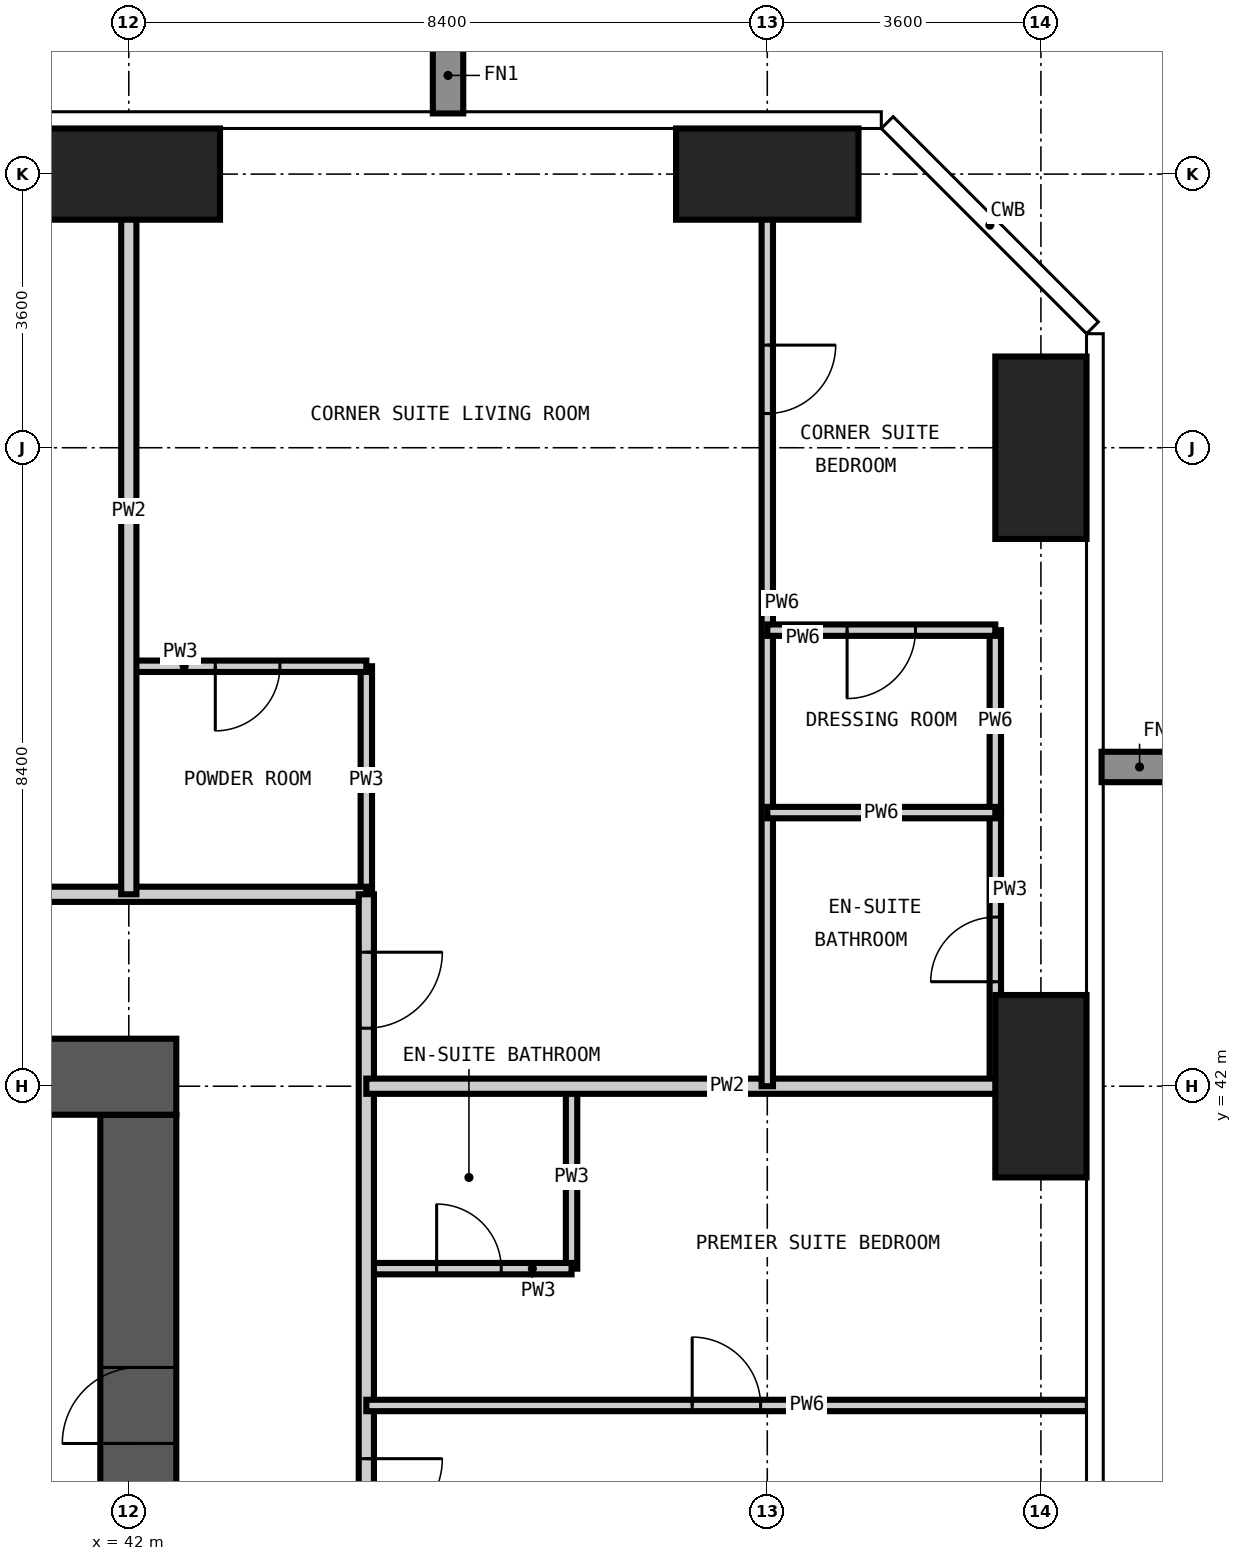
"""IFC4 building model, lengths in metres.
Left out: names, types, materials, properties, quantities, classifications, styles, units other than length and angle.
Written with IfcOpenShell. Run it as: python <this file> out.ifc"""

import sys

from ifc_helpers import new_model, si_unit, direction, frame, frame_2d, origin, origin_2d, place, context, subcontext, project, spatial, rectangle, extrude, element, fill, save


model = new_model("IFC4")
c1 = context("Model", 3, precision=1e-05, world=origin(), true_north=direction((0.0, 1.0)))
c2 = subcontext(c1, "Body", "Model", "MODEL_VIEW")
j1 = project(units=[si_unit("LENGTHUNIT", "METRE"), si_unit("PLANEANGLEUNIT", "RADIAN")], contexts=[c1])
p1 = place(None, origin())
s1 = spatial("IfcSite", under=j1, at=p1, CompositionType="ELEMENT")
p2 = place(p1, origin())
s2 = spatial("IfcBuilding", under=s1, at=p2, CompositionType="ELEMENT")
p3 = place(p2, frame((0.0, 0.0, 118.8)))
s3 = spatial("IfcBuildingStorey", under=s2, at=p3, CompositionType="ELEMENT", Elevation=118.8)
for number, where, z_axis, x_axis in (
    (1, (42.0, 54.0, -0.35), (0.0, 0.0, 1.0), (1.0, 0.0, 0.0)),
    (2, (50.4, 54.0, -0.35), (0.0, 0.0, 1.0), (1.0, 0.0, 0.0)),
):
    element("IfcColumn", number, at=place(p3, frame(where, z_axis=z_axis, x_axis=x_axis)), inside=s3, PredefinedType="COLUMN", context=c2, shape_type="SweptSolid", body=[
        extrude(rectangle(XDim=2.4, YDim=1.2, at=origin_2d()), origin(), (0.0, 0.0, 1.0), 3.6),
    ])
for number, where, z_axis, x_axis in (
    (3, (54.0, 42.0, -0.35), (0.0, 0.0, 1.0), (1.0, 0.0, 0.0)),
    (4, (54.0, 50.4, -0.35), (0.0, 0.0, 1.0), (1.0, 0.0, 0.0)),
):
    element("IfcColumn", number, at=place(p3, frame(where, z_axis=z_axis, x_axis=x_axis)), inside=s3, PredefinedType="COLUMN", context=c2, shape_type="SweptSolid", body=[
        extrude(rectangle(XDim=1.2, YDim=2.4, at=origin_2d()), origin(), (0.0, 0.0, 1.0), 3.6),
    ])
p4 = place(p3, frame((42.125, 17.175, -0.35), z_axis=(0.0, 0.0, 1.0), x_axis=(0.0, 1.0, 0.0)))
e5 = element("IfcWall", 5, at=p4, inside=s3, PredefinedType="SHEAR", context=c2, shape_type="SweptSolid", body=[
    extrude(rectangle(XDim=24.45, YDim=1.0, at=frame_2d((12.225, 0.0))), origin(), (0.0, 0.0, 1.0), 3.6),
])
p5 = place(p4, frame((0.425, 0.0, 0.35)))
e6 = element("IfcOpeningElement", 6, at=p5, cuts=e5, PredefinedType="OPENING", context=c2, shape_type="SweptSolid", body=[
    extrude(rectangle(XDim=1.2, YDim=2.2, at=frame_2d((0.6, 1.1))), frame((0.0, 0.51, 0.0), z_axis=(0.0, -1.0, 0.0), x_axis=(1.0, 0.0, 0.0)), (0.0, 0.0, 1.0), 1.02),
])
p6 = place(p4, frame((11.325, 0.0, 0.35)))
e7 = element("IfcOpeningElement", 7, at=p6, cuts=e5, PredefinedType="OPENING", context=c2, shape_type="SweptSolid", body=[
    extrude(rectangle(XDim=1.8, YDim=2.2, at=frame_2d((0.9, 1.1))), frame((0.0, 0.51, 0.0), z_axis=(0.0, -1.0, 0.0), x_axis=(1.0, 0.0, 0.0)), (0.0, 0.0, 1.0), 1.02),
])
p7 = place(p4, frame((20.125, 0.0, 0.35)))
e8 = element("IfcOpeningElement", 8, at=p7, cuts=e5, PredefinedType="OPENING", context=c2, shape_type="SweptSolid", body=[
    extrude(rectangle(XDim=1.0, YDim=2.1, at=frame_2d((0.5, 1.05))), frame((0.0, 0.51, 0.0), z_axis=(0.0, -1.0, 0.0), x_axis=(1.0, 0.0, 0.0)), (0.0, 0.0, 1.0), 1.02),
])
p8 = place(p3, frame((42.625, 42.125, -0.35), z_axis=(0.0, 0.0, 1.0), x_axis=(-1.0, 0.0, 0.0)))
e9 = element("IfcWall", 9, at=p8, inside=s3, PredefinedType="SHEAR", context=c2, shape_type="SweptSolid", body=[
    extrude(rectangle(XDim=26.45, YDim=1.0, at=frame_2d((13.225, 0.0))), origin(), (0.0, 0.0, 1.0), 3.6),
])
p9 = place(p8, frame((21.125, 0.0, 0.35)))
e10 = element("IfcOpeningElement", 10, at=p9, cuts=e9, PredefinedType="OPENING", context=c2, shape_type="SweptSolid", body=[
    extrude(rectangle(XDim=1.0, YDim=2.1, at=frame_2d((0.5, 1.05))), frame((0.0, 0.51, 0.0), z_axis=(0.0, -1.0, 0.0), x_axis=(1.0, 0.0, 0.0)), (0.0, 0.0, 1.0), 1.02),
])
p10 = place(p8, frame((10.525, 0.0, 0.35)))
e11 = element("IfcOpeningElement", 11, at=p10, cuts=e9, PredefinedType="OPENING", context=c2, shape_type="SweptSolid", body=[
    extrude(rectangle(XDim=1.2, YDim=2.2, at=frame_2d((0.6, 1.1))), frame((0.0, 0.51, 0.0), z_axis=(0.0, -1.0, 0.0), x_axis=(1.0, 0.0, 0.0)), (0.0, 0.0, 1.0), 1.02),
])
p11 = place(p3, frame((45.125, 44.525, 0.0), z_axis=(0.0, 0.0, 1.0), x_axis=(0.0, 1.0, 0.0)))
e12 = element("IfcWall", 12, at=p11, inside=s3, PredefinedType="PARTITIONING", context=c2, shape_type="SweptSolid", body=[
    extrude(rectangle(XDim=3.0, YDim=0.15, at=frame_2d((1.5, 0.0))), origin(), (0.0, 0.0, 1.0), 3.25),
])
p12 = place(p3, frame((47.825, 39.6, 0.0), z_axis=(0.0, 0.0, 1.0), x_axis=(0.0, 1.0, 0.0)))
e13 = element("IfcWall", 13, at=p12, inside=s3, PredefinedType="PARTITIONING", context=c2, shape_type="SweptSolid", body=[
    extrude(rectangle(XDim=2.4, YDim=0.15, at=frame_2d((1.2, 0.0))), origin(), (0.0, 0.0, 1.0), 3.25),
])
p13 = place(p3, frame((53.4, 42.0, 0.0), z_axis=(0.0, 0.0, 1.0), x_axis=(0.0, 1.0, 0.0)))
e14 = element("IfcWall", 14, at=p13, inside=s3, PredefinedType="PARTITIONING", context=c2, shape_type="SweptSolid", body=[
    extrude(rectangle(XDim=3.6, YDim=0.15, at=frame_2d((1.8, 0.0))), origin(), (0.0, 0.0, 1.0), 3.25),
])
p14 = place(p13, frame((1.375, 0.0, 0.0)))
e15 = element("IfcOpeningElement", 15, at=p14, cuts=e14, PredefinedType="OPENING", context=c2, shape_type="SweptSolid", body=[
    extrude(rectangle(XDim=0.85, YDim=2.1, at=frame_2d((0.425, 1.05))), frame((0.0, 0.085, 0.0), z_axis=(0.0, -1.0, 0.0), x_axis=(1.0, 0.0, 0.0)), (0.0, 0.0, 1.0), 0.17),
])
p15 = place(p3, frame((45.125, 39.6, 0.0), z_axis=(0.0, 0.0, 1.0), x_axis=(1.0, 0.0, 0.0)))
e16 = element("IfcWall", 16, at=p15, inside=s3, PredefinedType="PARTITIONING", context=c2, shape_type="SweptSolid", body=[
    extrude(rectangle(XDim=2.7, YDim=0.15, at=frame_2d((1.35, 0.0))), origin(), (0.0, 0.0, 1.0), 3.25),
])
p16 = place(p15, frame((0.925, 0.0, 0.0)))
e17 = element("IfcOpeningElement", 17, at=p16, cuts=e16, PredefinedType="OPENING", context=c2, shape_type="SweptSolid", body=[
    extrude(rectangle(XDim=0.85, YDim=2.1, at=frame_2d((0.425, 1.05))), frame((0.0, 0.085, 0.0), z_axis=(0.0, -1.0, 0.0), x_axis=(1.0, 0.0, 0.0)), (0.0, 0.0, 1.0), 0.17),
])
p17 = place(p3, frame((42.0, 47.525, 0.0), z_axis=(0.0, 0.0, 1.0), x_axis=(1.0, 0.0, 0.0)))
e18 = element("IfcWall", 18, at=p17, inside=s3, PredefinedType="PARTITIONING", context=c2, shape_type="SweptSolid", body=[
    extrude(rectangle(XDim=3.125, YDim=0.15, at=frame_2d((1.562, 0.0))), origin(), (0.0, 0.0, 1.0), 3.25),
])
p18 = place(p17, frame((1.138, 0.0, 0.0)))
e19 = element("IfcOpeningElement", 19, at=p18, cuts=e18, PredefinedType="OPENING", context=c2, shape_type="SweptSolid", body=[
    extrude(rectangle(XDim=0.85, YDim=2.1, at=frame_2d((0.425, 1.05))), frame((0.0, 0.085, 0.0), z_axis=(0.0, -1.0, 0.0), x_axis=(1.0, 0.0, 0.0)), (0.0, 0.0, 1.0), 0.17),
])
p19 = place(p3, frame((12.6, 44.525, 0.0), z_axis=(0.0, 0.0, 1.0), x_axis=(1.0, 0.0, 0.0)))
e20 = element("IfcWall", 20, at=p19, inside=s3, PredefinedType="PARTITIONING", context=c2, shape_type="SweptSolid", body=[
    extrude(rectangle(XDim=32.525, YDim=0.2, at=frame_2d((16.262, 0.0))), origin(), (0.0, 0.0, 1.0), 3.25),
])
p20 = place(p19, frame((9.1, 0.0, 0.0)))
e21 = element("IfcOpeningElement", 21, at=p20, cuts=e20, PredefinedType="OPENING", context=c2, shape_type="SweptSolid", body=[
    extrude(rectangle(XDim=1.0, YDim=2.2, at=frame_2d((0.5, 1.1))), frame((0.0, 0.11, 0.0), z_axis=(0.0, -1.0, 0.0), x_axis=(1.0, 0.0, 0.0)), (0.0, 0.0, 1.0), 0.22),
])
p21 = place(p19, frame((17.5, 0.0, 0.0)))
e22 = element("IfcOpeningElement", 22, at=p21, cuts=e20, PredefinedType="OPENING", context=c2, shape_type="SweptSolid", body=[
    extrude(rectangle(XDim=1.0, YDim=2.2, at=frame_2d((0.5, 1.1))), frame((0.0, 0.11, 0.0), z_axis=(0.0, -1.0, 0.0), x_axis=(1.0, 0.0, 0.0)), (0.0, 0.0, 1.0), 0.22),
])
p22 = place(p19, frame((25.9, 0.0, 0.0)))
e23 = element("IfcOpeningElement", 23, at=p22, cuts=e20, PredefinedType="OPENING", context=c2, shape_type="SweptSolid", body=[
    extrude(rectangle(XDim=1.0, YDim=2.2, at=frame_2d((0.5, 1.1))), frame((0.0, 0.11, 0.0), z_axis=(0.0, -1.0, 0.0), x_axis=(1.0, 0.0, 0.0)), (0.0, 0.0, 1.0), 0.22),
])
p23 = place(p3, frame((45.125, 44.525, 0.0), z_axis=(0.0, 0.0, 1.0), x_axis=(0.0, -1.0, 0.0)))
e24 = element("IfcWall", 24, at=p23, inside=s3, PredefinedType="PARTITIONING", context=c2, shape_type="SweptSolid", body=[
    extrude(rectangle(XDim=31.45, YDim=0.2, at=frame_2d((15.725, 0.0))), origin(), (0.0, 0.0, 1.0), 3.25),
])
p24 = place(p23, frame((24.225, 0.0, 0.0)))
e25 = element("IfcOpeningElement", 25, at=p24, cuts=e24, PredefinedType="OPENING", context=c2, shape_type="SweptSolid", body=[
    extrude(rectangle(XDim=1.0, YDim=2.2, at=frame_2d((0.5, 1.1))), frame((0.0, 0.11, 0.0), z_axis=(0.0, -1.0, 0.0), x_axis=(1.0, 0.0, 0.0)), (0.0, 0.0, 1.0), 0.22),
])
p25 = place(p23, frame((15.825, 0.0, 0.0)))
e26 = element("IfcOpeningElement", 26, at=p25, cuts=e24, PredefinedType="OPENING", context=c2, shape_type="SweptSolid", body=[
    extrude(rectangle(XDim=1.0, YDim=2.2, at=frame_2d((0.5, 1.1))), frame((0.0, 0.11, 0.0), z_axis=(0.0, -1.0, 0.0), x_axis=(1.0, 0.0, 0.0)), (0.0, 0.0, 1.0), 0.22),
])
p26 = place(p23, frame((7.425, 0.0, 0.0)))
e27 = element("IfcOpeningElement", 27, at=p26, cuts=e24, PredefinedType="OPENING", context=c2, shape_type="SweptSolid", body=[
    extrude(rectangle(XDim=1.0, YDim=2.2, at=frame_2d((0.5, 1.1))), frame((0.0, 0.11, 0.0), z_axis=(0.0, -1.0, 0.0), x_axis=(1.0, 0.0, 0.0)), (0.0, 0.0, 1.0), 0.22),
])
p27 = place(p23, frame((29.087, 0.0, 0.0)))
e28 = element("IfcOpeningElement", 28, at=p27, cuts=e24, PredefinedType="OPENING", context=c2, shape_type="SweptSolid", body=[
    extrude(rectangle(XDim=1.0, YDim=2.2, at=frame_2d((0.5, 1.1))), frame((0.0, 0.11, 0.0), z_axis=(0.0, -1.0, 0.0), x_axis=(1.0, 0.0, 0.0)), (0.0, 0.0, 1.0), 0.22),
])
p28 = place(p23, frame((0.762, 0.0, 0.0)))
e29 = element("IfcOpeningElement", 29, at=p28, cuts=e24, PredefinedType="OPENING", context=c2, shape_type="SweptSolid", body=[
    extrude(rectangle(XDim=1.0, YDim=2.2, at=frame_2d((0.5, 1.1))), frame((0.0, 0.11, 0.0), z_axis=(0.0, -1.0, 0.0), x_axis=(1.0, 0.0, 0.0)), (0.0, 0.0, 1.0), 0.22),
])
p29 = place(p3, frame((42.0, 44.525, 0.0), z_axis=(0.0, 0.0, 1.0), x_axis=(0.0, 1.0, 0.0)))
e30 = element("IfcWall", 30, at=p29, inside=s3, PredefinedType="PARTITIONING", context=c2, shape_type="SweptSolid", body=[
    extrude(rectangle(XDim=10.093, YDim=0.2, at=frame_2d((5.046, 0.0))), origin(), (0.0, 0.0, 1.0), 3.25),
])
p30 = place(p3, frame((45.125, 42.0, 0.0), z_axis=(0.0, 0.0, 1.0), x_axis=(1.0, 0.0, 0.0)))
e31 = element("IfcWall", 31, at=p30, inside=s3, PredefinedType="PARTITIONING", context=c2, shape_type="SweptSolid", body=[
    extrude(rectangle(XDim=9.493, YDim=0.2, at=frame_2d((4.747, 0.0))), origin(), (0.0, 0.0, 1.0), 3.25),
])
p31 = place(p3, frame((50.4, 42.0, 0.0), z_axis=(0.0, 0.0, 1.0), x_axis=(0.0, 1.0, 0.0)))
e32 = element("IfcWall", 32, at=p31, inside=s3, PredefinedType="PARTITIONING", context=c2, shape_type="SweptSolid", body=[
    extrude(rectangle(XDim=12.618, YDim=0.15, at=frame_2d((6.309, 0.0))), origin(), (0.0, 0.0, 1.0), 3.25),
])
p32 = place(p31, frame((8.85, 0.0, 0.0)))
e33 = element("IfcOpeningElement", 33, at=p32, cuts=e32, PredefinedType="OPENING", context=c2, shape_type="SweptSolid", body=[
    extrude(rectangle(XDim=0.9, YDim=2.1, at=frame_2d((0.45, 1.05))), frame((0.0, 0.085, 0.0), z_axis=(0.0, -1.0, 0.0), x_axis=(1.0, 0.0, 0.0)), (0.0, 0.0, 1.0), 0.17),
])
p33 = place(p3, frame((53.4, 45.6, 0.0), z_axis=(0.0, 0.0, 1.0), x_axis=(0.0, 1.0, 0.0)))
e34 = element("IfcWall", 34, at=p33, inside=s3, PredefinedType="PARTITIONING", context=c2, shape_type="SweptSolid", body=[
    extrude(rectangle(XDim=2.4, YDim=0.15, at=frame_2d((1.2, 0.0))), origin(), (0.0, 0.0, 1.0), 3.25),
])
p34 = place(p3, frame((45.125, 37.8, 0.0), z_axis=(0.0, 0.0, 1.0), x_axis=(1.0, 0.0, 0.0)))
e35 = element("IfcWall", 35, at=p34, inside=s3, PredefinedType="PARTITIONING", context=c2, shape_type="SweptSolid", body=[
    extrude(rectangle(XDim=9.493, YDim=0.15, at=frame_2d((4.747, 0.0))), origin(), (0.0, 0.0, 1.0), 3.25),
])
p35 = place(p34, frame((4.287, 0.0, 0.0)))
e36 = element("IfcOpeningElement", 36, at=p35, cuts=e35, PredefinedType="OPENING", context=c2, shape_type="SweptSolid", body=[
    extrude(rectangle(XDim=0.9, YDim=2.1, at=frame_2d((0.45, 1.05))), frame((0.0, 0.085, 0.0), z_axis=(0.0, -1.0, 0.0), x_axis=(1.0, 0.0, 0.0)), (0.0, 0.0, 1.0), 0.17),
])
p36 = place(p3, frame((50.4, 45.6, 0.0), z_axis=(0.0, 0.0, 1.0), x_axis=(1.0, 0.0, 0.0)))
e37 = element("IfcWall", 37, at=p36, inside=s3, PredefinedType="PARTITIONING", context=c2, shape_type="SweptSolid", body=[
    extrude(rectangle(XDim=3.0, YDim=0.15, at=frame_2d((1.5, 0.0))), origin(), (0.0, 0.0, 1.0), 3.25),
])
p37 = place(p3, frame((50.4, 48.0, 0.0), z_axis=(0.0, 0.0, 1.0), x_axis=(1.0, 0.0, 0.0)))
e38 = element("IfcWall", 38, at=p37, inside=s3, PredefinedType="PARTITIONING", context=c2, shape_type="SweptSolid", body=[
    extrude(rectangle(XDim=3.0, YDim=0.15, at=frame_2d((1.5, 0.0))), origin(), (0.0, 0.0, 1.0), 3.25),
])
p38 = place(p37, frame((1.05, 0.0, 0.0)))
e39 = element("IfcOpeningElement", 39, at=p38, cuts=e38, PredefinedType="OPENING", context=c2, shape_type="SweptSolid", body=[
    extrude(rectangle(XDim=0.9, YDim=2.1, at=frame_2d((0.45, 1.05))), frame((0.0, 0.085, 0.0), z_axis=(0.0, -1.0, 0.0), x_axis=(1.0, 0.0, 0.0)), (0.0, 0.0, 1.0), 0.17),
])
p39 = place(p26, origin())
e40 = element("IfcDoor", 40, at=p39, inside=s3, OperationType="SINGLE_SWING_LEFT", PredefinedType="DOOR", context=c2, shape_type="SweptSolid", body=[
    extrude(rectangle(XDim=1.0, YDim=2.2, at=frame_2d((0.5, 1.1))), frame((0.0, 0.025, 0.0), z_axis=(0.0, -1.0, 0.0), x_axis=(1.0, 0.0, 0.0)), (0.0, 0.0, 1.0), 0.05),
])
fill(e27, e40)
p40 = place(p35, origin())
e41 = element("IfcDoor", 41, at=p40, inside=s3, OperationType="SINGLE_SWING_LEFT", PredefinedType="DOOR", context=c2, shape_type="SweptSolid", body=[
    extrude(rectangle(XDim=0.9, YDim=2.1, at=frame_2d((0.45, 1.05))), frame((0.0, 0.025, 0.0), z_axis=(0.0, -1.0, 0.0), x_axis=(1.0, 0.0, 0.0)), (0.0, 0.0, 1.0), 0.05),
])
fill(e36, e41)
p41 = place(p16, origin())
e42 = element("IfcDoor", 42, at=p41, inside=s3, OperationType="SINGLE_SWING_LEFT", PredefinedType="DOOR", context=c2, shape_type="SweptSolid", body=[
    extrude(rectangle(XDim=0.85, YDim=2.1, at=frame_2d((0.425, 1.05))), frame((0.0, 0.025, 0.0), z_axis=(0.0, -1.0, 0.0), x_axis=(1.0, 0.0, 0.0)), (0.0, 0.0, 1.0), 0.05),
])
fill(e17, e42)
p42 = place(p28, origin())
e43 = element("IfcDoor", 43, at=p42, inside=s3, OperationType="SINGLE_SWING_LEFT", PredefinedType="DOOR", context=c2, shape_type="SweptSolid", body=[
    extrude(rectangle(XDim=1.0, YDim=2.2, at=frame_2d((0.5, 1.1))), frame((0.0, 0.025, 0.0), z_axis=(0.0, -1.0, 0.0), x_axis=(1.0, 0.0, 0.0)), (0.0, 0.0, 1.0), 0.05),
])
fill(e29, e43)
p43 = place(p18, frame((0.85, 0.0, 0.0), z_axis=(0.0, 0.0, 1.0), x_axis=(-1.0, 0.0, 0.0)))
e44 = element("IfcDoor", 44, at=p43, inside=s3, OperationType="SINGLE_SWING_RIGHT", PredefinedType="DOOR", context=c2, shape_type="SweptSolid", body=[
    extrude(rectangle(XDim=0.85, YDim=2.1, at=frame_2d((0.425, 1.05))), frame((0.0, 0.025, 0.0), z_axis=(0.0, -1.0, 0.0), x_axis=(1.0, 0.0, 0.0)), (0.0, 0.0, 1.0), 0.05),
])
fill(e19, e44)
p44 = place(p32, frame((0.9, 0.0, 0.0), z_axis=(0.0, 0.0, 1.0), x_axis=(-1.0, 0.0, 0.0)))
e45 = element("IfcDoor", 45, at=p44, inside=s3, OperationType="SINGLE_SWING_LEFT", PredefinedType="DOOR", context=c2, shape_type="SweptSolid", body=[
    extrude(rectangle(XDim=0.9, YDim=2.1, at=frame_2d((0.45, 1.05))), frame((0.0, 0.025, 0.0), z_axis=(0.0, -1.0, 0.0), x_axis=(1.0, 0.0, 0.0)), (0.0, 0.0, 1.0), 0.05),
])
fill(e33, e45)
p45 = place(p14, origin())
e46 = element("IfcDoor", 46, at=p45, inside=s3, OperationType="SINGLE_SWING_LEFT", PredefinedType="DOOR", context=c2, shape_type="SweptSolid", body=[
    extrude(rectangle(XDim=0.85, YDim=2.1, at=frame_2d((0.425, 1.05))), frame((0.0, 0.025, 0.0), z_axis=(0.0, -1.0, 0.0), x_axis=(1.0, 0.0, 0.0)), (0.0, 0.0, 1.0), 0.05),
])
fill(e15, e46)
p46 = place(p38, frame((0.9, 0.0, 0.0), z_axis=(0.0, 0.0, 1.0), x_axis=(-1.0, 0.0, 0.0)))
e47 = element("IfcDoor", 47, at=p46, inside=s3, OperationType="SINGLE_SWING_RIGHT", PredefinedType="DOOR", context=c2, shape_type="SweptSolid", body=[
    extrude(rectangle(XDim=0.9, YDim=2.1, at=frame_2d((0.45, 1.05))), frame((0.0, 0.025, 0.0), z_axis=(0.0, -1.0, 0.0), x_axis=(1.0, 0.0, 0.0)), (0.0, 0.0, 1.0), 0.05),
])
fill(e39, e47)
p47 = place(p7, origin())
e48 = element("IfcDoor", 48, at=p47, inside=s3, OperationType="SINGLE_SWING_LEFT", PredefinedType="DOOR", context=c2, shape_type="SweptSolid", body=[
    extrude(rectangle(XDim=1.0, YDim=2.1, at=frame_2d((0.5, 1.05))), frame((0.0, 0.025, 0.0), z_axis=(0.0, -1.0, 0.0), x_axis=(1.0, 0.0, 0.0)), (0.0, 0.0, 1.0), 0.05),
])
fill(e8, e48)
save(model, sys.argv[1])
